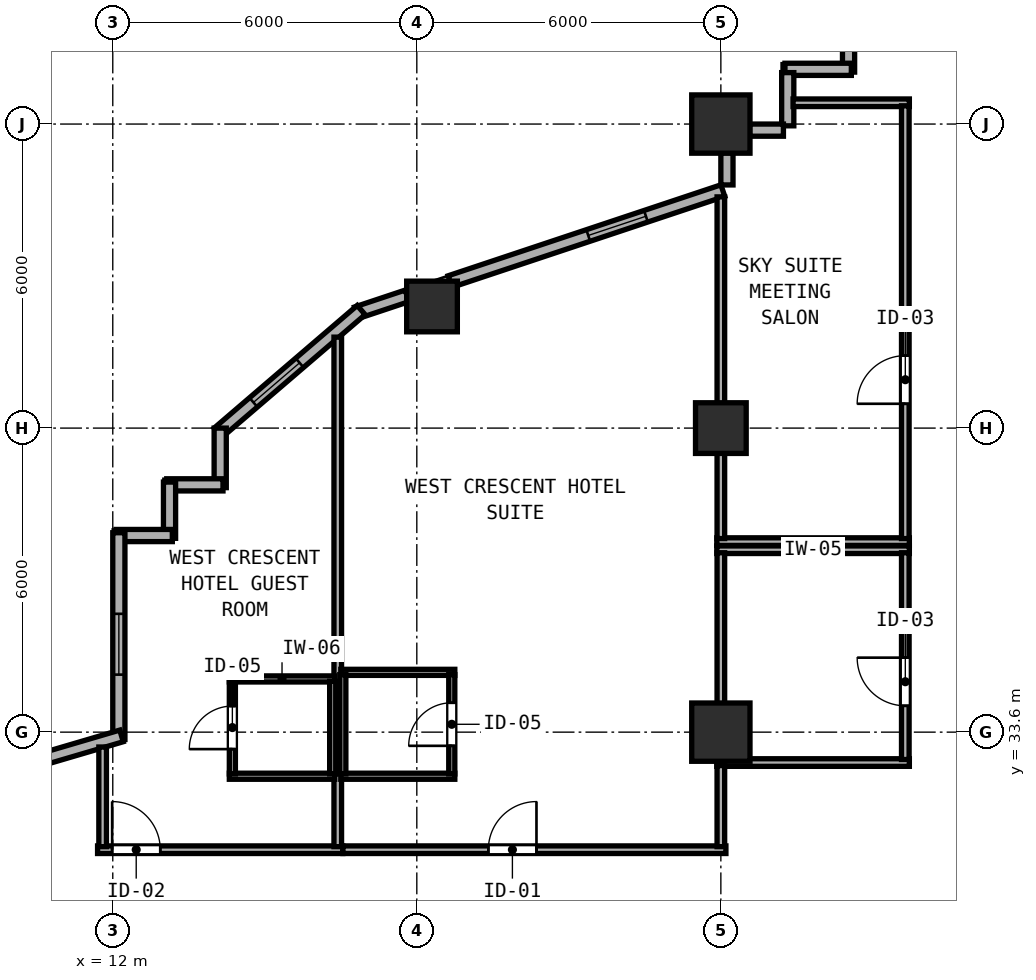
"""IFC4 building model, lengths in metres.
Left out: names, types, materials, properties, quantities, classifications, styles, units other than length and angle.
Written with IfcOpenShell. Run it as: python <this file> out.ifc"""

import sys

from ifc_helpers import new_model, si_unit, direction, frame, frame_2d, origin, origin_2d, place, context, subcontext, project, spatial, rectangle, hollow_rectangle, extrude, element, fill, save


model = new_model("IFC4")
c1 = context("Model", 3, precision=1e-05, world=origin(), true_north=direction((0.0, 1.0)))
c2 = subcontext(c1, "Body", "Model", "MODEL_VIEW")
j1 = project(units=[si_unit("LENGTHUNIT", "METRE"), si_unit("PLANEANGLEUNIT", "RADIAN")], contexts=[c1])
p1 = place(None, origin())
s1 = spatial("IfcSite", under=j1, at=p1, CompositionType="ELEMENT")
p2 = place(p1, origin())
s2 = spatial("IfcBuilding", under=s1, at=p2, CompositionType="ELEMENT")
p3 = place(p2, frame((0.0, 0.0, 55.2)))
s3 = spatial("IfcBuildingStorey", under=s2, at=p3, CompositionType="ELEMENT", Elevation=55.2)
for number, where, z_axis, x_axis in (
    (1, (24.0, 33.6, 0.0), (0.0, 0.0, 1.0), (1.0, 0.0, 0.0)),
    (2, (24.0, 45.6, 0.0), (0.0, 0.0, 1.0), (1.0, 0.0, 0.0)),
):
    element("IfcColumn", number, at=place(p3, frame(where, z_axis=z_axis, x_axis=x_axis)), inside=s3, PredefinedType="COLUMN", context=c2, shape_type="SweptSolid", body=[
        extrude(hollow_rectangle(XDim=1.15, YDim=1.15, WallThickness=0.042, at=origin_2d()), origin(), (0.0, 0.0, 1.0), 3.8),
    ])
for number, where, z_axis, x_axis in (
    (3, (24.0, 39.6, 0.0), (0.0, 0.0, 1.0), (1.0, 0.0, 0.0)),
    (4, (18.3, 42.0, 0.0), (0.0, 0.0, 1.0), (1.0, 0.0, 0.0)),
):
    element("IfcColumn", number, at=place(p3, frame(where, z_axis=z_axis, x_axis=x_axis)), inside=s3, PredefinedType="COLUMN", context=c2, shape_type="SweptSolid", body=[
        extrude(hollow_rectangle(XDim=1.0, YDim=1.0, WallThickness=0.038, at=origin_2d()), origin(), (0.0, 0.0, 1.0), 3.8),
    ])
p4 = place(p3, frame((26.52, 47.995, 0.0), z_axis=(0.0, 0.0, 1.0), x_axis=(0.0, -1.0, 0.0)))
e5 = element("IfcWall", 5, at=p4, inside=s3, PredefinedType="SOLIDWALL", context=c2, shape_type="SweptSolid", body=[
    extrude(rectangle(XDim=1.37, YDim=0.24, at=frame_2d((0.685, 0.0))), origin(), (0.0, 0.0, 1.0), 3.6),
])
p5 = place(p3, frame((26.575, 46.68, 0.0), z_axis=(0.0, 0.0, 1.0), x_axis=(-1.0, 0.0, 0.0)))
e6 = element("IfcWall", 6, at=p5, inside=s3, PredefinedType="SOLIDWALL", context=c2, shape_type="SweptSolid", body=[
    extrude(rectangle(XDim=1.31, YDim=0.24, at=frame_2d((0.655, 0.0))), origin(), (0.0, 0.0, 1.0), 3.6),
])
p6 = place(p3, frame((25.32, 46.615, 0.0), z_axis=(0.0, 0.0, 1.0), x_axis=(0.0, -1.0, 0.0)))
e7 = element("IfcWall", 7, at=p6, inside=s3, PredefinedType="SOLIDWALL", context=c2, shape_type="SweptSolid", body=[
    extrude(rectangle(XDim=1.05, YDim=0.24, at=frame_2d((0.525, 0.0))), origin(), (0.0, 0.0, 1.0), 3.6),
])
p7 = place(p3, frame((25.235, 45.48, 0.0), z_axis=(0.0, 0.0, 1.0), x_axis=(-1.0, 0.0, 0.0)))
e8 = element("IfcWall", 8, at=p7, inside=s3, PredefinedType="SOLIDWALL", context=c2, shape_type="SweptSolid", body=[
    extrude(rectangle(XDim=0.668, YDim=0.24, at=frame_2d((0.334, 0.0))), origin(), (0.0, 0.0, 1.0), 3.6),
])
p8 = place(p3, frame((24.12, 45.033, 0.0), z_axis=(0.0, 0.0, 1.0), x_axis=(0.0, -1.0, 0.0)))
e9 = element("IfcWall", 9, at=p8, inside=s3, PredefinedType="SOLIDWALL", context=c2, shape_type="SweptSolid", body=[
    extrude(rectangle(XDim=0.635, YDim=0.24, at=frame_2d((0.317, 0.0))), origin(), (0.0, 0.0, 1.0), 3.097),
])
p9 = place(p3, frame((24.039, 44.287, 0.0), z_axis=(0.0, 0.0, 1.0), x_axis=(-0.948678995954, -0.316240672014, 0.0)))
e10 = element("IfcWall", 10, at=p9, inside=s3, PredefinedType="SOLIDWALL", context=c2, shape_type="SweptSolid", body=[
    extrude(rectangle(XDim=5.675, YDim=0.24, at=frame_2d((2.837, 0.0))), origin(), (0.0, 0.0, 1.0), 3.097),
])
p10 = place(p9, frame((1.6, 0.0, 0.85)))
e11 = element("IfcOpeningElement", 11, at=p10, cuts=e10, PredefinedType="OPENING", context=c2, shape_type="SweptSolid", body=[
    extrude(rectangle(XDim=1.2, YDim=1.85, at=frame_2d((0.6, 0.925))), frame((0.0, 0.13, 0.0), z_axis=(0.0, -1.0, 0.0), x_axis=(1.0, 0.0, 0.0)), (0.0, 0.0, 1.0), 0.26),
])
p11 = place(p3, frame((17.808, 42.209, 0.0), z_axis=(0.0, 0.0, 1.0), x_axis=(-0.948706457285, -0.316158279832, 0.0)))
e12 = element("IfcWall", 12, at=p11, inside=s3, PredefinedType="SOLIDWALL", context=c2, shape_type="SweptSolid", body=[
    extrude(rectangle(XDim=1.054, YDim=0.24, at=frame_2d((0.527, 0.0))), origin(), (0.0, 0.0, 1.0), 3.6),
])
p12 = place(p3, frame((16.902, 41.929, 0.0), z_axis=(0.0, 0.0, 1.0), x_axis=(-0.759275136126, -0.650769750112, 0.0)))
e13 = element("IfcWall", 13, at=p12, inside=s3, PredefinedType="SOLIDWALL", context=c2, shape_type="SweptSolid", body=[
    extrude(rectangle(XDim=3.719, YDim=0.24, at=frame_2d((1.86, 0.0))), origin(), (0.0, 0.0, 1.0), 3.6),
])
p13 = place(p12, frame((1.6, 0.0, 0.85)))
e14 = element("IfcOpeningElement", 14, at=p13, cuts=e13, PredefinedType="OPENING", context=c2, shape_type="SweptSolid", body=[
    extrude(rectangle(XDim=1.2, YDim=1.85, at=frame_2d((0.6, 0.925))), frame((0.0, 0.13, 0.0), z_axis=(0.0, -1.0, 0.0), x_axis=(1.0, 0.0, 0.0)), (0.0, 0.0, 1.0), 0.26),
])
p14 = place(p3, frame((14.12, 39.6, 0.0), z_axis=(0.0, 0.0, 1.0), x_axis=(0.0, -1.0, 0.0)))
e15 = element("IfcWall", 15, at=p14, inside=s3, PredefinedType="SOLIDWALL", context=c2, shape_type="SweptSolid", body=[
    extrude(rectangle(XDim=1.175, YDim=0.24, at=frame_2d((0.587, 0.0))), origin(), (0.0, 0.0, 1.0), 3.6),
])
p15 = place(p3, frame((14.175, 38.48, 0.0), z_axis=(0.0, 0.0, 1.0), x_axis=(-1.0, 0.0, 0.0)))
e16 = element("IfcWall", 16, at=p15, inside=s3, PredefinedType="SOLIDWALL", context=c2, shape_type="SweptSolid", body=[
    extrude(rectangle(XDim=1.11, YDim=0.24, at=frame_2d((0.555, 0.0))), origin(), (0.0, 0.0, 1.0), 3.6),
])
p16 = place(p3, frame((13.12, 38.535, 0.0), z_axis=(0.0, 0.0, 1.0), x_axis=(0.0, -1.0, 0.0)))
e17 = element("IfcWall", 17, at=p16, inside=s3, PredefinedType="SOLIDWALL", context=c2, shape_type="SweptSolid", body=[
    extrude(rectangle(XDim=1.11, YDim=0.24, at=frame_2d((0.555, 0.0))), origin(), (0.0, 0.0, 1.0), 3.6),
])
p17 = place(p3, frame((13.175, 37.48, 0.0), z_axis=(0.0, 0.0, 1.0), x_axis=(-1.0, 0.0, 0.0)))
e18 = element("IfcWall", 18, at=p17, inside=s3, PredefinedType="SOLIDWALL", context=c2, shape_type="SweptSolid", body=[
    extrude(rectangle(XDim=1.11, YDim=0.24, at=frame_2d((0.555, 0.0))), origin(), (0.0, 0.0, 1.0), 3.6),
])
p18 = place(p3, frame((12.12, 37.535, 0.0), z_axis=(0.0, 0.0, 1.0), x_axis=(0.0, -1.0, 0.0)))
e19 = element("IfcWall", 19, at=p18, inside=s3, PredefinedType="SOLIDWALL", context=c2, shape_type="SweptSolid", body=[
    extrude(rectangle(XDim=4.08, YDim=0.24, at=frame_2d((2.04, 0.0))), origin(), (0.0, 0.0, 1.0), 3.6),
])
p19 = place(p18, frame((1.6, 0.0, 0.85)))
e20 = element("IfcOpeningElement", 20, at=p19, cuts=e19, PredefinedType="OPENING", context=c2, shape_type="SweptSolid", body=[
    extrude(rectangle(XDim=1.2, YDim=1.85, at=frame_2d((0.6, 0.925))), frame((0.0, 0.13, 0.0), z_axis=(0.0, -1.0, 0.0), x_axis=(1.0, 0.0, 0.0)), (0.0, 0.0, 1.0), 0.26),
])
p20 = place(p3, frame((12.173, 33.526, 0.0), z_axis=(0.0, 0.0, 1.0), x_axis=(-0.959372673811, -0.28214193723, 0.0)))
e21 = element("IfcWall", 21, at=p20, inside=s3, PredefinedType="SOLIDWALL", context=c2, shape_type="SweptSolid", body=[
    extrude(rectangle(XDim=8.672, YDim=0.24, at=frame_2d((4.336, 0.0))), origin(), (0.0, 0.0, 1.0), 3.6),
])
p21 = place(p20, frame((1.6, 0.0, 0.85)))
e22 = element("IfcOpeningElement", 22, at=p21, cuts=e21, PredefinedType="OPENING", context=c2, shape_type="SweptSolid", body=[
    extrude(rectangle(XDim=1.2, YDim=1.85, at=frame_2d((0.6, 0.925))), frame((0.0, 0.13, 0.0), z_axis=(0.0, -1.0, 0.0), x_axis=(1.0, 0.0, 0.0)), (0.0, 0.0, 1.0), 0.26),
])
for number, where, z_axis, x_axis in (
    (23, (23.92, 37.2, 0.0), (0.0, 0.0, 1.0), (1.0, 0.0, 0.0)),
    (24, (23.92, 33.0, 0.0), (0.0, 0.0, 1.0), (1.0, 0.0, 0.0)),
):
    element("IfcWall", number, at=place(p3, frame(where, z_axis=z_axis, x_axis=x_axis)), inside=s3, PredefinedType="PARTITIONING", context=c2, shape_type="SweptSolid", body=[
        extrude(rectangle(XDim=3.8, YDim=0.15, at=frame_2d((1.9, 0.0))), origin(), (0.0, 0.0, 1.0), 3.6),
    ])
p22 = place(p3, frame((24.0, 33.06, 0.0), z_axis=(0.0, 0.0, 1.0), x_axis=(0.0, 1.0, 0.0)))
e25 = element("IfcWall", 25, at=p22, inside=s3, PredefinedType="PARTITIONING", context=c2, shape_type="SweptSolid", body=[
    extrude(rectangle(XDim=4.08, YDim=0.15, at=frame_2d((2.04, 0.0))), origin(), (0.0, 0.0, 1.0), 3.097),
])
p23 = place(p3, frame((27.64, 33.06, 0.0), z_axis=(0.0, 0.0, 1.0), x_axis=(0.0, 1.0, 0.0)))
e26 = element("IfcWall", 26, at=p23, inside=s3, PredefinedType="PARTITIONING", context=c2, shape_type="SweptSolid", body=[
    extrude(rectangle(XDim=4.08, YDim=0.15, at=frame_2d((2.04, 0.0))), origin(), (0.0, 0.0, 1.0), 3.6),
])
p24 = place(p23, frame((2.01, 0.0, 0.0), z_axis=(0.0, 0.0, 1.0), x_axis=(-1.0, 0.0, 0.0)))
e27 = element("IfcOpeningElement", 27, at=p24, cuts=e26, PredefinedType="OPENING", context=c2, shape_type="SweptSolid", body=[
    extrude(rectangle(XDim=0.95, YDim=2.12, at=frame_2d((0.475, 1.06))), frame((0.0, 0.085, 0.0), z_axis=(0.0, -1.0, 0.0), x_axis=(1.0, 0.0, 0.0)), (0.0, 0.0, 1.0), 0.17),
])
p25 = place(p3, frame((25.425, 46.02, 0.0), z_axis=(0.0, 0.0, 1.0), x_axis=(1.0, 0.0, 0.0)))
e28 = element("IfcWall", 28, at=p25, inside=s3, PredefinedType="PARTITIONING", context=c2, shape_type="SweptSolid", body=[
    extrude(rectangle(XDim=2.295, YDim=0.15, at=frame_2d((1.147, 0.0))), origin(), (0.0, 0.0, 1.0), 3.6),
])
p26 = place(p3, frame((23.92, 37.36, 0.0), z_axis=(0.0, 0.0, 1.0), x_axis=(1.0, 0.0, 0.0)))
e29 = element("IfcWall", 29, at=p26, inside=s3, PredefinedType="PARTITIONING", context=c2, shape_type="SweptSolid", body=[
    extrude(rectangle(XDim=3.8, YDim=0.15, at=frame_2d((1.9, 0.0))), origin(), (0.0, 0.0, 1.0), 3.6),
])
p27 = place(p3, frame((24.0, 37.42, 0.0), z_axis=(0.0, 0.0, 1.0), x_axis=(0.0, 1.0, 0.0)))
e30 = element("IfcWall", 30, at=p27, inside=s3, PredefinedType="PARTITIONING", context=c2, shape_type="SweptSolid", body=[
    extrude(rectangle(XDim=6.743, YDim=0.15, at=frame_2d((3.372, 0.0))), origin(), (0.0, 0.0, 1.0), 3.097),
])
p28 = place(p3, frame((27.64, 37.42, 0.0), z_axis=(0.0, 0.0, 1.0), x_axis=(0.0, 1.0, 0.0)))
e31 = element("IfcWall", 31, at=p28, inside=s3, PredefinedType="PARTITIONING", context=c2, shape_type="SweptSolid", body=[
    extrude(rectangle(XDim=8.54, YDim=0.15, at=frame_2d((4.27, 0.0))), origin(), (0.0, 0.0, 1.0), 3.6),
])
p29 = place(p28, frame((3.61, 0.0, 0.0), z_axis=(0.0, 0.0, 1.0), x_axis=(-1.0, 0.0, 0.0)))
e32 = element("IfcOpeningElement", 32, at=p29, cuts=e31, PredefinedType="OPENING", context=c2, shape_type="SweptSolid", body=[
    extrude(rectangle(XDim=0.95, YDim=2.12, at=frame_2d((0.475, 1.06))), frame((0.0, 0.085, 0.0), z_axis=(0.0, -1.0, 0.0), x_axis=(1.0, 0.0, 0.0)), (0.0, 0.0, 1.0), 0.17),
])
p30 = place(p3, frame((11.7, 31.28, 0.0), z_axis=(0.0, 0.0, 1.0), x_axis=(1.0, 0.0, 0.0)))
e33 = element("IfcWall", 33, at=p30, inside=s3, PredefinedType="PARTITIONING", context=c2, shape_type="SweptSolid", body=[
    extrude(rectangle(XDim=4.84, YDim=0.15, at=frame_2d((2.42, 0.0))), origin(), (0.0, 0.0, 1.0), 3.6),
])
p31 = place(p30, frame((0.288, 0.0, 0.0)))
e34 = element("IfcOpeningElement", 34, at=p31, cuts=e33, PredefinedType="OPENING", context=c2, shape_type="SweptSolid", body=[
    extrude(rectangle(XDim=0.95, YDim=2.15, at=frame_2d((0.475, 1.075))), frame((0.0, 0.085, 0.0), z_axis=(0.0, -1.0, 0.0), x_axis=(1.0, 0.0, 0.0)), (0.0, 0.0, 1.0), 0.17),
])
p32 = place(p3, frame((11.8, 31.34, 0.0), z_axis=(0.0, 0.0, 1.0), x_axis=(0.0, 1.0, 0.0)))
e35 = element("IfcWall", 35, at=p32, inside=s3, PredefinedType="PARTITIONING", context=c2, shape_type="SweptSolid", body=[
    extrude(rectangle(XDim=1.967, YDim=0.15, at=frame_2d((0.983, 0.0))), origin(), (0.0, 0.0, 1.0), 3.6),
])
p33 = place(p3, frame((16.44, 31.34, 0.0), z_axis=(0.0, 0.0, 1.0), x_axis=(0.0, 1.0, 0.0)))
e36 = element("IfcWall", 36, at=p33, inside=s3, PredefinedType="PARTITIONING", context=c2, shape_type="SweptSolid", body=[
    extrude(rectangle(XDim=10.055, YDim=0.15, at=frame_2d((5.027, 0.0))), origin(), (0.0, 0.0, 1.0), 3.6),
])
for number, where, z_axis, x_axis in (
    (37, (14.3, 34.65, 0.0), (0.0, 0.0, 1.0), (1.0, 0.0, 0.0)),
    (38, (14.3, 32.73, 0.0), (0.0, 0.0, 1.0), (1.0, 0.0, 0.0)),
):
    element("IfcWall", number, at=place(p3, frame(where, z_axis=z_axis, x_axis=x_axis)), inside=s3, PredefinedType="PARTITIONING", context=c2, shape_type="SweptSolid", body=[
        extrude(rectangle(XDim=2.08, YDim=0.12, at=frame_2d((1.04, 0.0))), origin(), (0.0, 0.0, 1.0), 3.6),
    ])
p34 = place(p3, frame((14.36, 32.775, 0.0), z_axis=(0.0, 0.0, 1.0), x_axis=(0.0, 1.0, 0.0)))
e39 = element("IfcWall", 39, at=p34, inside=s3, PredefinedType="PARTITIONING", context=c2, shape_type="SweptSolid", body=[
    extrude(rectangle(XDim=1.83, YDim=0.12, at=frame_2d((0.915, 0.0))), origin(), (0.0, 0.0, 1.0), 3.6),
])
p35 = place(p34, frame((1.34, 0.0, 0.0), z_axis=(0.0, 0.0, 1.0), x_axis=(-1.0, 0.0, 0.0)))
e40 = element("IfcOpeningElement", 40, at=p35, cuts=e39, PredefinedType="OPENING", context=c2, shape_type="SweptSolid", body=[
    extrude(rectangle(XDim=0.85, YDim=2.1, at=frame_2d((0.425, 1.05))), frame((0.0, 0.07, 0.0), z_axis=(0.0, -1.0, 0.0), x_axis=(1.0, 0.0, 0.0)), (0.0, 0.0, 1.0), 0.14),
])
p36 = place(p3, frame((16.34, 32.775, 0.0), z_axis=(0.0, 0.0, 1.0), x_axis=(0.0, 1.0, 0.0)))
e41 = element("IfcWall", 41, at=p36, inside=s3, PredefinedType="PARTITIONING", context=c2, shape_type="SweptSolid", body=[
    extrude(rectangle(XDim=1.83, YDim=0.12, at=frame_2d((0.915, 0.0))), origin(), (0.0, 0.0, 1.0), 3.6),
])
p37 = place(p3, frame((16.542, 31.28, 0.0), z_axis=(0.0, 0.0, 1.0), x_axis=(1.0, 0.0, 0.0)))
e42 = element("IfcWall", 42, at=p37, inside=s3, PredefinedType="PARTITIONING", context=c2, shape_type="SweptSolid", body=[
    extrude(rectangle(XDim=7.558, YDim=0.15, at=frame_2d((3.779, 0.0))), origin(), (0.0, 0.0, 1.0), 3.6),
])
p38 = place(p37, frame((2.869, 0.0, 0.0)))
e43 = element("IfcOpeningElement", 43, at=p38, cuts=e42, PredefinedType="OPENING", context=c2, shape_type="SweptSolid", body=[
    extrude(rectangle(XDim=0.95, YDim=2.18, at=frame_2d((0.475, 1.09))), frame((0.0, 0.085, 0.0), z_axis=(0.0, -1.0, 0.0), x_axis=(1.0, 0.0, 0.0)), (0.0, 0.0, 1.0), 0.17),
])
p39 = place(p3, frame((24.0, 31.34, 0.0), z_axis=(0.0, 0.0, 1.0), x_axis=(0.0, 1.0, 0.0)))
e44 = element("IfcWall", 44, at=p39, inside=s3, PredefinedType="PARTITIONING", context=c2, shape_type="SweptSolid", body=[
    extrude(rectangle(XDim=1.6, YDim=0.15, at=frame_2d((0.8, 0.0))), origin(), (0.0, 0.0, 1.0), 3.097),
])
for number, where, z_axis, x_axis in (
    (45, (16.5, 34.78, 0.0), (0.0, 0.0, 1.0), (1.0, 0.0, 0.0)),
    (46, (16.5, 32.73, 0.0), (0.0, 0.0, 1.0), (1.0, 0.0, 0.0)),
):
    element("IfcWall", number, at=place(p3, frame(where, z_axis=z_axis, x_axis=x_axis)), inside=s3, PredefinedType="PARTITIONING", context=c2, shape_type="SweptSolid", body=[
        extrude(rectangle(XDim=2.25, YDim=0.12, at=frame_2d((1.125, 0.0))), origin(), (0.0, 0.0, 1.0), 3.6),
    ])
p40 = place(p3, frame((16.54, 32.775, 0.0), z_axis=(0.0, 0.0, 1.0), x_axis=(0.0, 1.0, 0.0)))
e47 = element("IfcWall", 47, at=p40, inside=s3, PredefinedType="PARTITIONING", context=c2, shape_type="SweptSolid", body=[
    extrude(rectangle(XDim=1.96, YDim=0.12, at=frame_2d((0.98, 0.0))), origin(), (0.0, 0.0, 1.0), 3.6),
])
p41 = place(p3, frame((18.69, 32.775, 0.0), z_axis=(0.0, 0.0, 1.0), x_axis=(0.0, 1.0, 0.0)))
e48 = element("IfcWall", 48, at=p41, inside=s3, PredefinedType="PARTITIONING", context=c2, shape_type="SweptSolid", body=[
    extrude(rectangle(XDim=1.96, YDim=0.12, at=frame_2d((0.98, 0.0))), origin(), (0.0, 0.0, 1.0), 3.6),
])
p42 = place(p41, frame((0.555, 0.0, 0.0)))
e49 = element("IfcOpeningElement", 49, at=p42, cuts=e48, PredefinedType="OPENING", context=c2, shape_type="SweptSolid", body=[
    extrude(rectangle(XDim=0.85, YDim=2.1, at=frame_2d((0.425, 1.05))), frame((0.0, 0.07, 0.0), z_axis=(0.0, -1.0, 0.0), x_axis=(1.0, 0.0, 0.0)), (0.0, 0.0, 1.0), 0.14),
])
p43 = place(p10, origin())
e50 = element("IfcWindow", 50, at=p43, inside=s3, PartitioningType="SINGLE_PANEL", PredefinedType="WINDOW", context=c2, shape_type="SweptSolid", body=[
    extrude(rectangle(XDim=1.2, YDim=1.85, at=frame_2d((0.6, 0.925))), frame((0.0, 0.03, 0.0), z_axis=(0.0, -1.0, 0.0), x_axis=(1.0, 0.0, 0.0)), (0.0, 0.0, 1.0), 0.06),
])
fill(e11, e50)
p44 = place(p13, origin())
e51 = element("IfcWindow", 51, at=p44, inside=s3, PartitioningType="SINGLE_PANEL", PredefinedType="WINDOW", context=c2, shape_type="SweptSolid", body=[
    extrude(rectangle(XDim=1.2, YDim=1.85, at=frame_2d((0.6, 0.925))), frame((0.0, 0.03, 0.0), z_axis=(0.0, -1.0, 0.0), x_axis=(1.0, 0.0, 0.0)), (0.0, 0.0, 1.0), 0.06),
])
fill(e14, e51)
p45 = place(p19, origin())
e52 = element("IfcWindow", 52, at=p45, inside=s3, PartitioningType="SINGLE_PANEL", PredefinedType="WINDOW", context=c2, shape_type="SweptSolid", body=[
    extrude(rectangle(XDim=1.2, YDim=1.85, at=frame_2d((0.6, 0.925))), frame((0.0, 0.03, 0.0), z_axis=(0.0, -1.0, 0.0), x_axis=(1.0, 0.0, 0.0)), (0.0, 0.0, 1.0), 0.06),
])
fill(e20, e52)
p46 = place(p24, origin())
e53 = element("IfcDoor", 53, at=p46, inside=s3, OperationType="SINGLE_SWING_LEFT", PredefinedType="DOOR", context=c2, shape_type="SweptSolid", body=[
    extrude(rectangle(XDim=0.95, YDim=2.12, at=frame_2d((0.475, 1.06))), frame((0.0, 0.025, 0.0), z_axis=(0.0, -1.0, 0.0), x_axis=(1.0, 0.0, 0.0)), (0.0, 0.0, 1.0), 0.05),
])
fill(e27, e53)
p47 = place(p29, origin())
e54 = element("IfcDoor", 54, at=p47, inside=s3, OperationType="SINGLE_SWING_RIGHT", PredefinedType="DOOR", context=c2, shape_type="SweptSolid", body=[
    extrude(rectangle(XDim=0.95, YDim=2.12, at=frame_2d((0.475, 1.06))), frame((0.0, 0.025, 0.0), z_axis=(0.0, -1.0, 0.0), x_axis=(1.0, 0.0, 0.0)), (0.0, 0.0, 1.0), 0.05),
])
fill(e32, e54)
p48 = place(p31, origin())
e55 = element("IfcDoor", 55, at=p48, inside=s3, OperationType="SINGLE_SWING_LEFT", PredefinedType="DOOR", context=c2, shape_type="SweptSolid", body=[
    extrude(rectangle(XDim=0.95, YDim=2.15, at=frame_2d((0.475, 1.075))), frame((0.0, 0.025, 0.0), z_axis=(0.0, -1.0, 0.0), x_axis=(1.0, 0.0, 0.0)), (0.0, 0.0, 1.0), 0.05),
])
fill(e34, e55)
p49 = place(p35, origin())
e56 = element("IfcDoor", 56, at=p49, inside=s3, OperationType="SINGLE_SWING_RIGHT", PredefinedType="DOOR", context=c2, shape_type="SweptSolid", body=[
    extrude(rectangle(XDim=0.85, YDim=2.1, at=frame_2d((0.425, 1.05))), frame((0.0, 0.025, 0.0), z_axis=(0.0, -1.0, 0.0), x_axis=(1.0, 0.0, 0.0)), (0.0, 0.0, 1.0), 0.05),
])
fill(e40, e56)
p50 = place(p38, origin())
e57 = element("IfcDoor", 57, at=p50, inside=s3, OperationType="SINGLE_SWING_RIGHT", PredefinedType="DOOR", context=c2, shape_type="SweptSolid", body=[
    extrude(rectangle(XDim=0.95, YDim=2.18, at=frame_2d((0.475, 1.09))), frame((0.0, 0.025, 0.0), z_axis=(0.0, -1.0, 0.0), x_axis=(1.0, 0.0, 0.0)), (0.0, 0.0, 1.0), 0.05),
])
fill(e43, e57)
p51 = place(p42, origin())
e58 = element("IfcDoor", 58, at=p51, inside=s3, OperationType="SINGLE_SWING_LEFT", PredefinedType="DOOR", context=c2, shape_type="SweptSolid", body=[
    extrude(rectangle(XDim=0.85, YDim=2.1, at=frame_2d((0.425, 1.05))), frame((0.0, 0.025, 0.0), z_axis=(0.0, -1.0, 0.0), x_axis=(1.0, 0.0, 0.0)), (0.0, 0.0, 1.0), 0.05),
])
fill(e49, e58)
save(model, sys.argv[1])
